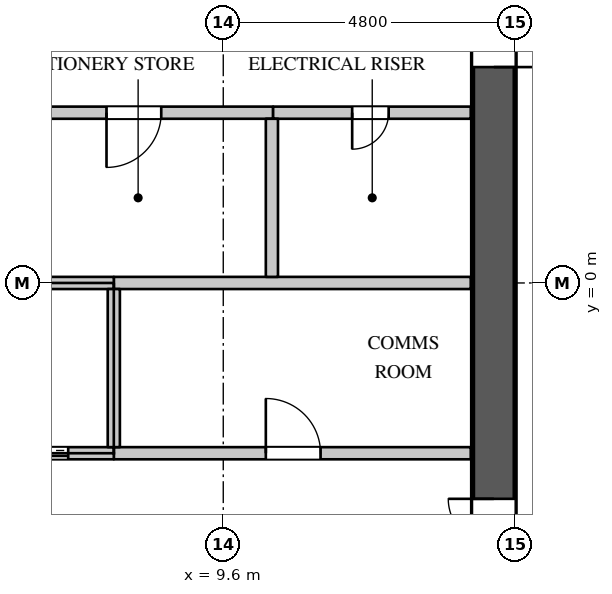
"""IFC4 building model, lengths in metres.
Left out: names, types, materials, properties, quantities, classifications, styles, units other than length and angle.
Written with IfcOpenShell. Run it as: python <this file> out.ifc"""

import sys

from ifc_helpers import new_model, si_unit, direction, frame, frame_2d, origin, place, context, subcontext, project, spatial, rectangle, extrude, element, fill, save


model = new_model("IFC4")
c1 = context("Model", 3, precision=1e-05, world=origin(), true_north=direction((0.0, 1.0)))
c2 = subcontext(c1, "Body", "Model", "MODEL_VIEW")
j1 = project(units=[si_unit("LENGTHUNIT", "METRE"), si_unit("PLANEANGLEUNIT", "RADIAN")], contexts=[c1])
p1 = place(None, origin())
s1 = spatial("IfcSite", under=j1, at=p1, CompositionType="ELEMENT")
p2 = place(p1, origin())
s2 = spatial("IfcBuilding", under=s1, at=p2, CompositionType="ELEMENT")
p3 = place(p2, frame((0.0, 0.0, 166.5)))
s3 = spatial("IfcBuildingStorey", under=s2, at=p3, CompositionType="ELEMENT", Elevation=166.5)
p4 = place(p3, frame((14.05, -11.3, 0.0), z_axis=(0.0, 0.0, 1.0), x_axis=(0.0, 1.0, 0.0)))
e1 = element("IfcWall", 1, at=p4, inside=s3, PredefinedType="SHEAR", context=c2, shape_type="SweptSolid", body=[
    extrude(rectangle(XDim=22.6, YDim=0.7, at=frame_2d((11.3, 0.0))), origin(), (0.0, 0.0, 1.0), 4.2),
])
p5 = place(p4, frame((20.35, 0.0, 0.0)))
e2 = element("IfcOpeningElement", 2, at=p5, cuts=e1, PredefinedType="OPENING", context=c2, shape_type="SweptSolid", body=[
    extrude(rectangle(XDim=1.1, YDim=2.2, at=frame_2d((0.55, 1.1))), frame((0.0, 0.36, 0.0), z_axis=(0.0, -1.0, 0.0), x_axis=(1.0, 0.0, 0.0)), (0.0, 0.0, 1.0), 0.72),
])
p6 = place(p4, frame((1.15, 0.0, 0.0)))
e3 = element("IfcOpeningElement", 3, at=p6, cuts=e1, PredefinedType="OPENING", context=c2, shape_type="SweptSolid", body=[
    extrude(rectangle(XDim=1.1, YDim=2.2, at=frame_2d((0.55, 1.1))), frame((0.0, 0.36, 0.0), z_axis=(0.0, -1.0, 0.0), x_axis=(1.0, 0.0, 0.0)), (0.0, 0.0, 1.0), 0.72),
])
p7 = place(p4, frame((14.85, 0.0, 0.0)))
e4 = element("IfcOpeningElement", 4, at=p7, cuts=e1, PredefinedType="OPENING", context=c2, shape_type="SweptSolid", body=[
    extrude(rectangle(XDim=1.5, YDim=2.4, at=frame_2d((0.75, 1.2))), frame((0.0, 0.36, 0.0), z_axis=(0.0, -1.0, 0.0), x_axis=(1.0, 0.0, 0.0)), (0.0, 0.0, 1.0), 0.72),
])
p8 = place(p4, frame((6.25, 0.0, 0.0)))
e5 = element("IfcOpeningElement", 5, at=p8, cuts=e1, PredefinedType="OPENING", context=c2, shape_type="SweptSolid", body=[
    extrude(rectangle(XDim=1.5, YDim=2.4, at=frame_2d((0.75, 1.2))), frame((0.0, 0.36, 0.0), z_axis=(0.0, -1.0, 0.0), x_axis=(1.0, 0.0, 0.0)), (0.0, 0.0, 1.0), 0.72),
])
p9 = place(p3, frame((-7.82, 2.8, 0.0), z_axis=(0.0, 0.0, 1.0), x_axis=(1.0, 0.0, 0.0)))
e6 = element("IfcWall", 6, at=p9, inside=s3, PredefinedType="PARTITIONING", context=c2, shape_type="SweptSolid", body=[
    extrude(rectangle(XDim=18.24, YDim=0.2, at=frame_2d((9.12, 0.0))), origin(), (0.0, 0.0, 1.0), 3.95),
])
p10 = place(p9, frame((2.75, 0.0, 0.0)))
e7 = element("IfcOpeningElement", 7, at=p10, cuts=e6, PredefinedType="OPENING", context=c2, shape_type="SweptSolid", body=[
    extrude(rectangle(XDim=0.9, YDim=2.2, at=frame_2d((0.45, 1.1))), frame((0.0, 0.11, 0.0), z_axis=(0.0, -1.0, 0.0), x_axis=(1.0, 0.0, 0.0)), (0.0, 0.0, 1.0), 0.22),
])
p11 = place(p9, frame((9.55, 0.0, 0.0)))
e8 = element("IfcOpeningElement", 8, at=p11, cuts=e6, PredefinedType="OPENING", context=c2, shape_type="SweptSolid", body=[
    extrude(rectangle(XDim=0.9, YDim=2.2, at=frame_2d((0.45, 1.1))), frame((0.0, 0.11, 0.0), z_axis=(0.0, -1.0, 0.0), x_axis=(1.0, 0.0, 0.0)), (0.0, 0.0, 1.0), 0.22),
])
p12 = place(p9, frame((15.5, 0.0, 0.0)))
e9 = element("IfcOpeningElement", 9, at=p12, cuts=e6, PredefinedType="OPENING", context=c2, shape_type="SweptSolid", body=[
    extrude(rectangle(XDim=0.9, YDim=2.2, at=frame_2d((0.45, 1.1))), frame((0.0, 0.11, 0.0), z_axis=(0.0, -1.0, 0.0), x_axis=(1.0, 0.0, 0.0)), (0.0, 0.0, 1.0), 0.22),
])
p13 = place(p3, frame((7.8, -2.8, 0.0), z_axis=(0.0, 0.0, 1.0), x_axis=(1.0, 0.0, 0.0)))
e10 = element("IfcWall", 10, at=p13, inside=s3, PredefinedType="PARTITIONING", context=c2, shape_type="SweptSolid", body=[
    extrude(rectangle(XDim=5.87, YDim=0.2, at=frame_2d((2.935, 0.0))), origin(), (0.0, 0.0, 1.0), 3.95),
])
p14 = place(p13, frame((2.5, 0.0, 0.0)))
e11 = element("IfcOpeningElement", 11, at=p14, cuts=e10, PredefinedType="OPENING", context=c2, shape_type="SweptSolid", body=[
    extrude(rectangle(XDim=0.9, YDim=2.2, at=frame_2d((0.45, 1.1))), frame((0.0, 0.11, 0.0), z_axis=(0.0, -1.0, 0.0), x_axis=(1.0, 0.0, 0.0)), (0.0, 0.0, 1.0), 0.22),
])
p15 = place(p3, frame((7.8, 0.0, 0.0), z_axis=(0.0, 0.0, 1.0), x_axis=(1.0, 0.0, 0.0)))
e12 = element("IfcWall", 12, at=p15, inside=s3, PredefinedType="PARTITIONING", context=c2, shape_type="SweptSolid", body=[
    extrude(rectangle(XDim=5.87, YDim=0.2, at=frame_2d((2.935, 0.0))), origin(), (0.0, 0.0, 1.0), 3.95),
])
p16 = place(p3, frame((10.42, 2.8, 0.0), z_axis=(0.0, 0.0, 1.0), x_axis=(1.0, 0.0, 0.0)))
e13 = element("IfcWall", 13, at=p16, inside=s3, PredefinedType="PARTITIONING", context=c2, shape_type="SweptSolid", body=[
    extrude(rectangle(XDim=3.25, YDim=0.2, at=frame_2d((1.625, 0.0))), origin(), (0.0, 0.0, 1.0), 3.95),
])
p17 = place(p16, frame((1.3, 0.0, 0.0)))
e14 = element("IfcOpeningElement", 14, at=p17, cuts=e13, PredefinedType="OPENING", context=c2, shape_type="SweptSolid", body=[
    extrude(rectangle(XDim=0.6, YDim=2.0, at=frame_2d((0.3, 1.0))), frame((0.0, 0.11, 0.0), z_axis=(0.0, -1.0, 0.0), x_axis=(1.0, 0.0, 0.0)), (0.0, 0.0, 1.0), 0.22),
])
p18 = place(p3, frame((10.4, 0.1, 0.0), z_axis=(0.0, 0.0, 1.0), x_axis=(0.0, 1.0, 0.0)))
e15 = element("IfcWall", 15, at=p18, inside=s3, PredefinedType="PARTITIONING", context=c2, shape_type="SweptSolid", body=[
    extrude(rectangle(XDim=2.6, YDim=0.2, at=frame_2d((1.3, 0.0))), origin(), (0.0, 0.0, 1.0), 3.95),
])
p19 = place(p3, frame((-13.67, 0.0, 0.0), z_axis=(0.0, 0.0, 1.0), x_axis=(1.0, 0.0, 0.0)))
e16 = element("IfcWall", 16, at=p19, inside=s3, PredefinedType="PARTITIONING", context=c2, shape_type="SweptSolid", body=[
    extrude(rectangle(XDim=21.47, YDim=0.2, at=frame_2d((10.735, 0.0))), origin(), (0.0, 0.0, 1.0), 3.95),
])
p20 = place(p3, frame((-10.4, -2.8, 0.0), z_axis=(0.0, 0.0, 1.0), x_axis=(1.0, 0.0, 0.0)))
e17 = element("IfcWall", 17, at=p20, inside=s3, PredefinedType="PARTITIONING", context=c2, shape_type="SweptSolid", body=[
    extrude(rectangle(XDim=18.2, YDim=0.2, at=frame_2d((9.1, 0.0))), origin(), (0.0, 0.0, 1.0), 3.95),
])
p21 = place(p20, frame((0.75, 0.0, 0.0)))
e18 = element("IfcOpeningElement", 18, at=p21, cuts=e17, PredefinedType="OPENING", context=c2, shape_type="SweptSolid", body=[
    extrude(rectangle(XDim=1.1, YDim=2.2, at=frame_2d((0.55, 1.1))), frame((0.0, 0.11, 0.0), z_axis=(0.0, -1.0, 0.0), x_axis=(1.0, 0.0, 0.0)), (0.0, 0.0, 1.0), 0.22),
])
p22 = place(p20, frame((3.35, 0.0, 0.0)))
e19 = element("IfcOpeningElement", 19, at=p22, cuts=e17, PredefinedType="OPENING", context=c2, shape_type="SweptSolid", body=[
    extrude(rectangle(XDim=1.1, YDim=2.2, at=frame_2d((0.55, 1.1))), frame((0.0, 0.11, 0.0), z_axis=(0.0, -1.0, 0.0), x_axis=(1.0, 0.0, 0.0)), (0.0, 0.0, 1.0), 0.22),
])
p23 = place(p20, frame((5.95, 0.0, 0.0)))
e20 = element("IfcOpeningElement", 20, at=p23, cuts=e17, PredefinedType="OPENING", context=c2, shape_type="SweptSolid", body=[
    extrude(rectangle(XDim=1.1, YDim=2.2, at=frame_2d((0.55, 1.1))), frame((0.0, 0.11, 0.0), z_axis=(0.0, -1.0, 0.0), x_axis=(1.0, 0.0, 0.0)), (0.0, 0.0, 1.0), 0.22),
])
p24 = place(p20, frame((8.55, 0.0, 0.0)))
e21 = element("IfcOpeningElement", 21, at=p24, cuts=e17, PredefinedType="OPENING", context=c2, shape_type="SweptSolid", body=[
    extrude(rectangle(XDim=1.1, YDim=2.2, at=frame_2d((0.55, 1.1))), frame((0.0, 0.11, 0.0), z_axis=(0.0, -1.0, 0.0), x_axis=(1.0, 0.0, 0.0)), (0.0, 0.0, 1.0), 0.22),
])
p25 = place(p20, frame((11.15, 0.0, 0.0)))
e22 = element("IfcOpeningElement", 22, at=p25, cuts=e17, PredefinedType="OPENING", context=c2, shape_type="SweptSolid", body=[
    extrude(rectangle(XDim=1.1, YDim=2.2, at=frame_2d((0.55, 1.1))), frame((0.0, 0.11, 0.0), z_axis=(0.0, -1.0, 0.0), x_axis=(1.0, 0.0, 0.0)), (0.0, 0.0, 1.0), 0.22),
])
p26 = place(p20, frame((13.75, 0.0, 0.0)))
e23 = element("IfcOpeningElement", 23, at=p26, cuts=e17, PredefinedType="OPENING", context=c2, shape_type="SweptSolid", body=[
    extrude(rectangle(XDim=1.1, YDim=2.2, at=frame_2d((0.55, 1.1))), frame((0.0, 0.11, 0.0), z_axis=(0.0, -1.0, 0.0), x_axis=(1.0, 0.0, 0.0)), (0.0, 0.0, 1.0), 0.22),
])
p27 = place(p20, frame((16.35, 0.0, 0.0)))
e24 = element("IfcOpeningElement", 24, at=p27, cuts=e17, PredefinedType="OPENING", context=c2, shape_type="SweptSolid", body=[
    extrude(rectangle(XDim=1.1, YDim=2.2, at=frame_2d((0.55, 1.1))), frame((0.0, 0.11, 0.0), z_axis=(0.0, -1.0, 0.0), x_axis=(1.0, 0.0, 0.0)), (0.0, 0.0, 1.0), 0.22),
])
p28 = place(p3, frame((7.8, -2.7, 0.0), z_axis=(0.0, 0.0, 1.0), x_axis=(0.0, 1.0, 0.0)))
e25 = element("IfcWall", 25, at=p28, inside=s3, PredefinedType="PARTITIONING", context=c2, shape_type="SweptSolid", body=[
    extrude(rectangle(XDim=2.6, YDim=0.2, at=frame_2d((1.3, 0.0))), origin(), (0.0, 0.0, 1.0), 3.95),
])
p29 = place(p17, origin())
e26 = element("IfcDoor", 26, at=p29, inside=s3, OperationType="SINGLE_SWING_RIGHT", PredefinedType="DOOR", context=c2, shape_type="SweptSolid", body=[
    extrude(rectangle(XDim=0.6, YDim=2.0, at=frame_2d((0.3, 1.0))), frame((0.0, 0.025, 0.0), z_axis=(0.0, -1.0, 0.0), x_axis=(1.0, 0.0, 0.0)), (0.0, 0.0, 1.0), 0.05),
])
fill(e14, e26)
p30 = place(p14, origin())
e27 = element("IfcDoor", 27, at=p30, inside=s3, OperationType="SINGLE_SWING_LEFT", PredefinedType="DOOR", context=c2, shape_type="SweptSolid", body=[
    extrude(rectangle(XDim=0.9, YDim=2.2, at=frame_2d((0.45, 1.1))), frame((0.0, 0.025, 0.0), z_axis=(0.0, -1.0, 0.0), x_axis=(1.0, 0.0, 0.0)), (0.0, 0.0, 1.0), 0.05),
])
fill(e11, e27)
p31 = place(p12, origin())
e28 = element("IfcDoor", 28, at=p31, inside=s3, OperationType="SINGLE_SWING_RIGHT", PredefinedType="DOOR", context=c2, shape_type="SweptSolid", body=[
    extrude(rectangle(XDim=0.9, YDim=2.2, at=frame_2d((0.45, 1.1))), frame((0.0, 0.025, 0.0), z_axis=(0.0, -1.0, 0.0), x_axis=(1.0, 0.0, 0.0)), (0.0, 0.0, 1.0), 0.05),
])
fill(e9, e28)
p32 = place(p27, origin())
e29 = element("IfcDoor", 29, at=p32, inside=s3, OperationType="DOUBLE_DOOR_SLIDING", PredefinedType="DOOR", context=c2, shape_type="SweptSolid", body=[
    extrude(rectangle(XDim=1.1, YDim=2.2, at=frame_2d((0.55, 1.1))), frame((0.0, 0.025, 0.0), z_axis=(0.0, -1.0, 0.0), x_axis=(1.0, 0.0, 0.0)), (0.0, 0.0, 1.0), 0.05),
])
fill(e24, e29)
p33 = place(p7, origin())
e30 = element("IfcDoor", 30, at=p33, inside=s3, OperationType="DOUBLE_DOOR_SINGLE_SWING", PredefinedType="DOOR", context=c2, shape_type="SweptSolid", body=[
    extrude(rectangle(XDim=1.5, YDim=2.4, at=frame_2d((0.75, 1.2))), frame((0.0, -0.295, 0.0), z_axis=(0.0, -1.0, 0.0), x_axis=(1.0, 0.0, 0.0)), (0.0, 0.0, 1.0), 0.05),
])
fill(e4, e30)
p34 = place(p8, origin())
e31 = element("IfcDoor", 31, at=p34, inside=s3, OperationType="DOUBLE_DOOR_SINGLE_SWING", PredefinedType="DOOR", context=c2, shape_type="SweptSolid", body=[
    extrude(rectangle(XDim=1.5, YDim=2.4, at=frame_2d((0.75, 1.2))), frame((0.0, 0.345, 0.0), z_axis=(0.0, -1.0, 0.0), x_axis=(1.0, 0.0, 0.0)), (0.0, 0.0, 1.0), 0.05),
])
fill(e5, e31)
save(model, sys.argv[1])
